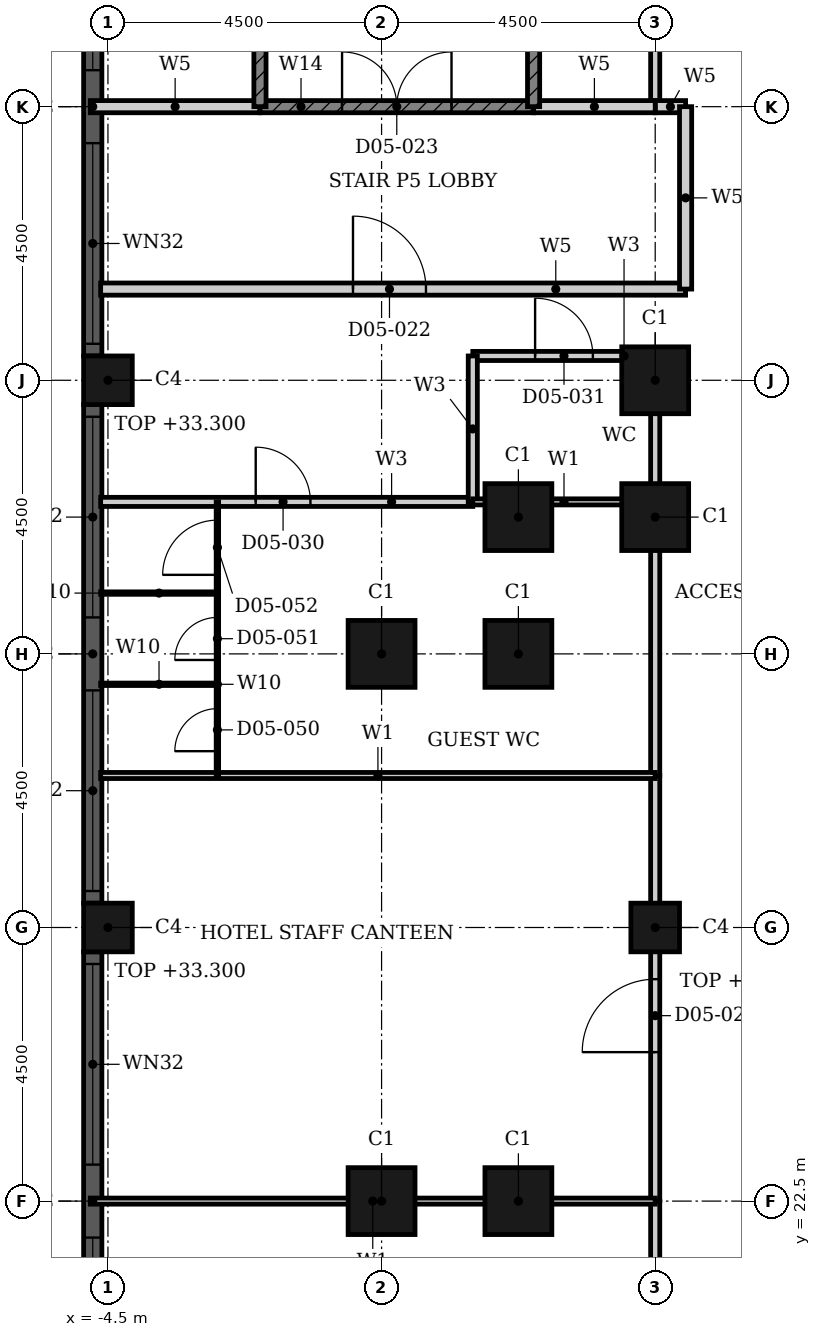
"""IFC4 building model, lengths in metres.
Left out: names, types, materials, properties, quantities, classifications, styles, units other than length and angle.
Written with IfcOpenShell. Run it as: python <this file> out.ifc"""

import sys

from ifc_helpers import new_model, si_unit, direction, frame, frame_2d, origin, origin_2d, place, context, subcontext, project, spatial, rectangle, hollow_rectangle, extrude, element, fill, save


model = new_model("IFC4")
c1 = context("Model", 3, precision=1e-05, world=origin(), true_north=direction((0.0, 1.0)))
c2 = subcontext(c1, "Body", "Model", "MODEL_VIEW")
j1 = project(units=[si_unit("LENGTHUNIT", "METRE"), si_unit("PLANEANGLEUNIT", "RADIAN")], contexts=[c1])
p1 = place(None, origin())
s1 = spatial("IfcSite", under=j1, at=p1, CompositionType="ELEMENT")
p2 = place(p1, origin())
s2 = spatial("IfcBuilding", under=s1, at=p2, CompositionType="ELEMENT")
p3 = place(p2, frame((0.0, 0.0, 28.8)))
s3 = spatial("IfcBuildingStorey", under=s2, at=p3, CompositionType="ELEMENT", Elevation=28.8)
for number, where, z_axis, x_axis in (
    (1, (4.5, 36.0, 0.0), (0.0, 0.0, 1.0), (1.0, 0.0, 0.0)),
    (2, (4.5, 33.75, 0.0), (0.0, 0.0, 1.0), (1.0, 0.0, 0.0)),
    (3, (2.25, 33.75, 0.0), (0.0, 0.0, 1.0), (1.0, 0.0, 0.0)),
    (4, (2.25, 31.5, 0.0), (0.0, 0.0, 1.0), (1.0, 0.0, 0.0)),
    (5, (0.0, 31.5, 0.0), (0.0, 0.0, 1.0), (1.0, 0.0, 0.0)),
    (6, (0.0, 22.5, 0.0), (0.0, 0.0, 1.0), (1.0, 0.0, 0.0)),
    (7, (2.25, 22.5, 0.0), (0.0, 0.0, 1.0), (1.0, 0.0, 0.0)),
):
    element("IfcColumn", number, at=place(p3, frame(where, z_axis=z_axis, x_axis=x_axis)), inside=s3, PredefinedType="COLUMN", context=c2, shape_type="SweptSolid", body=[
        extrude(hollow_rectangle(XDim=1.1, YDim=1.1, WallThickness=0.036, at=origin_2d()), origin(), (0.0, 0.0, 1.0), 4.8),
    ])
for number, where, z_axis, x_axis in (
    (8, (-4.5, 27.0, 0.0), (0.0, 0.0, 1.0), (1.0, 0.0, 0.0)),
    (9, (-4.5, 36.0, 0.0), (0.0, 0.0, 1.0), (1.0, 0.0, 0.0)),
    (10, (4.5, 27.0, 0.0), (0.0, 0.0, 1.0), (1.0, 0.0, 0.0)),
):
    element("IfcColumn", number, at=place(p3, frame(where, z_axis=z_axis, x_axis=x_axis)), inside=s3, PredefinedType="COLUMN", context=c2, shape_type="SweptSolid", body=[
        extrude(hollow_rectangle(XDim=0.8, YDim=0.8, WallThickness=0.025, at=origin_2d()), origin(), (0.0, 0.0, 1.0), 4.5),
    ])
p4 = place(p3, frame((-4.75, 44.6, 0.0), z_axis=(0.0, 0.0, 1.0), x_axis=(0.0, -1.0, 0.0)))
e11 = element("IfcWall", 11, at=p4, inside=s3, PredefinedType="SOLIDWALL", context=c2, shape_type="SweptSolid", body=[
    extrude(rectangle(XDim=8.2, YDim=0.3, at=frame_2d((4.1, 0.0))), origin(), (0.0, 0.0, 1.0), 4.8),
])
p5 = place(p4, frame((0.2, 0.0, 0.9)))
e12 = element("IfcOpeningElement", 12, at=p5, cuts=e11, PredefinedType="OPENING", context=c2, shape_type="SweptSolid", body=[
    extrude(rectangle(XDim=3.3, YDim=2.9, at=frame_2d((1.65, 1.45))), frame((0.0, 0.16, 0.0), z_axis=(0.0, -1.0, 0.0), x_axis=(1.0, 0.0, 0.0)), (0.0, 0.0, 1.0), 0.32),
])
p6 = place(p4, frame((4.7, 0.0, 0.9)))
e13 = element("IfcOpeningElement", 13, at=p6, cuts=e11, PredefinedType="OPENING", context=c2, shape_type="SweptSolid", body=[
    extrude(rectangle(XDim=3.3, YDim=2.9, at=frame_2d((1.65, 1.45))), frame((0.0, 0.16, 0.0), z_axis=(0.0, -1.0, 0.0), x_axis=(1.0, 0.0, 0.0)), (0.0, 0.0, 1.0), 0.32),
])
p7 = place(p3, frame((-4.75, 35.6, 0.0), z_axis=(0.0, 0.0, 1.0), x_axis=(0.0, -1.0, 0.0)))
e14 = element("IfcWall", 14, at=p7, inside=s3, PredefinedType="SOLIDWALL", context=c2, shape_type="SweptSolid", body=[
    extrude(rectangle(XDim=8.2, YDim=0.3, at=frame_2d((4.1, 0.0))), origin(), (0.0, 0.0, 1.0), 4.8),
])
p8 = place(p7, frame((0.2, 0.0, 0.9)))
e15 = element("IfcOpeningElement", 15, at=p8, cuts=e14, PredefinedType="OPENING", context=c2, shape_type="SweptSolid", body=[
    extrude(rectangle(XDim=3.3, YDim=2.9, at=frame_2d((1.65, 1.45))), frame((0.0, 0.16, 0.0), z_axis=(0.0, -1.0, 0.0), x_axis=(1.0, 0.0, 0.0)), (0.0, 0.0, 1.0), 0.32),
])
p9 = place(p7, frame((4.7, 0.0, 0.9)))
e16 = element("IfcOpeningElement", 16, at=p9, cuts=e14, PredefinedType="OPENING", context=c2, shape_type="SweptSolid", body=[
    extrude(rectangle(XDim=3.3, YDim=2.9, at=frame_2d((1.65, 1.45))), frame((0.0, 0.16, 0.0), z_axis=(0.0, -1.0, 0.0), x_axis=(1.0, 0.0, 0.0)), (0.0, 0.0, 1.0), 0.32),
])
p10 = place(p3, frame((-4.75, 26.6, 0.0), z_axis=(0.0, 0.0, 1.0), x_axis=(0.0, -1.0, 0.0)))
e17 = element("IfcWall", 17, at=p10, inside=s3, PredefinedType="SOLIDWALL", context=c2, shape_type="SweptSolid", body=[
    extrude(rectangle(XDim=8.2, YDim=0.3, at=frame_2d((4.1, 0.0))), origin(), (0.0, 0.0, 1.0), 4.8),
])
p11 = place(p10, frame((0.2, 0.0, 0.9)))
e18 = element("IfcOpeningElement", 18, at=p11, cuts=e17, PredefinedType="OPENING", context=c2, shape_type="SweptSolid", body=[
    extrude(rectangle(XDim=3.3, YDim=2.9, at=frame_2d((1.65, 1.45))), frame((0.0, 0.16, 0.0), z_axis=(0.0, -1.0, 0.0), x_axis=(1.0, 0.0, 0.0)), (0.0, 0.0, 1.0), 0.32),
])
p12 = place(p10, frame((4.7, 0.0, 0.9)))
e19 = element("IfcOpeningElement", 19, at=p12, cuts=e17, PredefinedType="OPENING", context=c2, shape_type="SweptSolid", body=[
    extrude(rectangle(XDim=3.3, YDim=2.9, at=frame_2d((1.65, 1.45))), frame((0.0, 0.16, 0.0), z_axis=(0.0, -1.0, 0.0), x_axis=(1.0, 0.0, 0.0)), (0.0, 0.0, 1.0), 0.32),
])
p13 = place(p3, frame((-4.62, 34.0, 0.0), z_axis=(0.0, 0.0, 1.0), x_axis=(1.0, 0.0, 0.0)))
e20 = element("IfcWall", 20, at=p13, inside=s3, PredefinedType="PARTITIONING", context=c2, shape_type="SweptSolid", body=[
    extrude(rectangle(XDim=6.12, YDim=0.15, at=frame_2d((3.06, 0.0))), origin(), (0.0, 0.0, 1.0), 4.5),
])
p14 = place(p13, frame((2.55, 0.0, 0.0)))
e21 = element("IfcOpeningElement", 21, at=p14, cuts=e20, PredefinedType="OPENING", context=c2, shape_type="SweptSolid", body=[
    extrude(rectangle(XDim=0.9, YDim=2.1, at=frame_2d((0.45, 1.05))), frame((0.0, 0.085, 0.0), z_axis=(0.0, -1.0, 0.0), x_axis=(1.0, 0.0, 0.0)), (0.0, 0.0, 1.0), 0.17),
])
p15 = place(p3, frame((1.5, 36.4, 0.0), z_axis=(0.0, 0.0, 1.0), x_axis=(1.0, 0.0, 0.0)))
e22 = element("IfcWall", 22, at=p15, inside=s3, PredefinedType="PARTITIONING", context=c2, shape_type="SweptSolid", body=[
    extrude(rectangle(XDim=3.0, YDim=0.15, at=frame_2d((1.5, 0.0))), origin(), (0.0, 0.0, 1.0), 4.5),
])
p16 = place(p15, frame((1.025, 0.0, 0.0)))
e23 = element("IfcOpeningElement", 23, at=p16, cuts=e22, PredefinedType="OPENING", context=c2, shape_type="SweptSolid", body=[
    extrude(rectangle(XDim=0.95, YDim=2.1, at=frame_2d((0.475, 1.05))), frame((0.0, 0.085, 0.0), z_axis=(0.0, -1.0, 0.0), x_axis=(1.0, 0.0, 0.0)), (0.0, 0.0, 1.0), 0.17),
])
p17 = place(p3, frame((1.5, 34.0, 0.0), z_axis=(0.0, 0.0, 1.0), x_axis=(0.0, 1.0, 0.0)))
e24 = element("IfcWall", 24, at=p17, inside=s3, PredefinedType="PARTITIONING", context=c2, shape_type="SweptSolid", body=[
    extrude(rectangle(XDim=2.4, YDim=0.15, at=frame_2d((1.2, 0.0))), origin(), (0.0, 0.0, 1.0), 4.5),
])
p18 = place(p3, frame((4.5, 9.0, 0.0), z_axis=(0.0, 0.0, 1.0), x_axis=(0.0, 1.0, 0.0)))
e25 = element("IfcWall", 25, at=p18, inside=s3, PredefinedType="PARTITIONING", context=c2, shape_type="SweptSolid", body=[
    extrude(rectangle(XDim=13.5, YDim=0.15, at=frame_2d((6.75, 0.0))), origin(), (0.0, 0.0, 1.0), 3.88),
])
p19 = place(p18, frame((6.3, 0.0, 0.0)))
e26 = element("IfcOpeningElement", 26, at=p19, cuts=e25, PredefinedType="OPENING", context=c2, shape_type="SweptSolid", body=[
    extrude(rectangle(XDim=0.9, YDim=2.1, at=frame_2d((0.45, 1.05))), frame((0.0, 0.085, 0.0), z_axis=(0.0, -1.0, 0.0), x_axis=(1.0, 0.0, 0.0)), (0.0, 0.0, 1.0), 0.17),
])
p20 = place(p3, frame((4.5, 22.5, 0.0), z_axis=(0.0, 0.0, 1.0), x_axis=(0.0, 1.0, 0.0)))
e27 = element("IfcWall", 27, at=p20, inside=s3, PredefinedType="PARTITIONING", context=c2, shape_type="SweptSolid", body=[
    extrude(rectangle(XDim=7.0, YDim=0.15, at=frame_2d((3.5, 0.0))), origin(), (0.0, 0.0, 1.0), 4.5),
])
p21 = place(p20, frame((2.45, 0.0, 0.0)))
e28 = element("IfcOpeningElement", 28, at=p21, cuts=e27, PredefinedType="OPENING", context=c2, shape_type="SweptSolid", body=[
    extrude(rectangle(XDim=1.2, YDim=2.4, at=frame_2d((0.6, 1.2))), frame((0.0, 0.085, 0.0), z_axis=(0.0, -1.0, 0.0), x_axis=(1.0, 0.0, 0.0)), (0.0, 0.0, 1.0), 0.17),
])
p22 = place(p3, frame((4.5, 29.5, 0.0), z_axis=(0.0, 0.0, 1.0), x_axis=(0.0, 1.0, 0.0)))
e29 = element("IfcWall", 29, at=p22, inside=s3, PredefinedType="PARTITIONING", context=c2, shape_type="SweptSolid", body=[
    extrude(rectangle(XDim=4.5, YDim=0.15, at=frame_2d((2.25, 0.0))), origin(), (0.0, 0.0, 1.0), 4.5),
])
p23 = place(p3, frame((4.5, 34.0, 0.0), z_axis=(0.0, 0.0, 1.0), x_axis=(0.0, 1.0, 0.0)))
e30 = element("IfcWall", 30, at=p23, inside=s3, PredefinedType="PARTITIONING", context=c2, shape_type="SweptSolid", body=[
    extrude(rectangle(XDim=2.4, YDim=0.15, at=frame_2d((1.2, 0.0))), origin(), (0.0, 0.0, 1.0), 3.88),
])
p24 = place(p3, frame((4.5, 40.5, 0.0), z_axis=(0.0, 0.0, 1.0), x_axis=(0.0, 1.0, 0.0)))
e31 = element("IfcWall", 31, at=p24, inside=s3, PredefinedType="PARTITIONING", context=c2, shape_type="SweptSolid", body=[
    extrude(rectangle(XDim=13.69, YDim=0.15, at=frame_2d((6.845, 0.0))), origin(), (0.0, 0.0, 1.0), 4.5),
])
p25 = place(p24, frame((6.15, 0.0, 0.0)))
e32 = element("IfcOpeningElement", 32, at=p25, cuts=e31, PredefinedType="OPENING", context=c2, shape_type="SweptSolid", body=[
    extrude(rectangle(XDim=1.2, YDim=2.4, at=frame_2d((0.6, 1.2))), frame((0.0, 0.085, 0.0), z_axis=(0.0, -1.0, 0.0), x_axis=(1.0, 0.0, 0.0)), (0.0, 0.0, 1.0), 0.17),
])
p26 = place(p3, frame((-4.79, 22.5, 0.0), z_axis=(0.0, 0.0, 1.0), x_axis=(1.0, 0.0, 0.0)))
e33 = element("IfcWall", 33, at=p26, inside=s3, PredefinedType="PARTITIONING", context=c2, shape_type="SweptSolid", body=[
    extrude(rectangle(XDim=9.29, YDim=0.1, at=frame_2d((4.645, 0.0))), origin(), (0.0, 0.0, 1.0), 3.78),
])
p27 = place(p3, frame((-4.62, 29.5, 0.0), z_axis=(0.0, 0.0, 1.0), x_axis=(1.0, 0.0, 0.0)))
e34 = element("IfcWall", 34, at=p27, inside=s3, PredefinedType="PARTITIONING", context=c2, shape_type="SweptSolid", body=[
    extrude(rectangle(XDim=9.12, YDim=0.1, at=frame_2d((4.56, 0.0))), origin(), (0.0, 0.0, 1.0), 4.5),
])
p28 = place(p3, frame((1.5, 34.0, 0.0), z_axis=(0.0, 0.0, 1.0), x_axis=(1.0, 0.0, 0.0)))
e35 = element("IfcWall", 35, at=p28, inside=s3, PredefinedType="PARTITIONING", context=c2, shape_type="SweptSolid", body=[
    extrude(rectangle(XDim=3.0, YDim=0.1, at=frame_2d((1.5, 0.0))), origin(), (0.0, 0.0, 1.0), 4.5),
])
p29 = place(p3, frame((-4.62, 37.5, 0.0), z_axis=(0.0, 0.0, 1.0), x_axis=(1.0, 0.0, 0.0)))
e36 = element("IfcWall", 36, at=p29, inside=s3, PredefinedType="PARTITIONING", context=c2, shape_type="SweptSolid", body=[
    extrude(rectangle(XDim=9.62, YDim=0.2, at=frame_2d((4.81, 0.0))), origin(), (0.0, 0.0, 1.0), 4.5),
])
p30 = place(p29, frame((4.15, 0.0, 0.0)))
e37 = element("IfcOpeningElement", 37, at=p30, cuts=e36, PredefinedType="OPENING", context=c2, shape_type="SweptSolid", body=[
    extrude(rectangle(XDim=1.2, YDim=2.1, at=frame_2d((0.6, 1.05))), frame((0.0, 0.11, 0.0), z_axis=(0.0, -1.0, 0.0), x_axis=(1.0, 0.0, 0.0)), (0.0, 0.0, 1.0), 0.22),
])
p31 = place(p3, frame((4.5, 40.5, 0.0), z_axis=(0.0, 0.0, 1.0), x_axis=(1.0, 0.0, 0.0)))
e38 = element("IfcWall", 38, at=p31, inside=s3, PredefinedType="PARTITIONING", context=c2, shape_type="SweptSolid", body=[
    extrude(rectangle(XDim=0.5, YDim=0.2, at=frame_2d((0.25, 0.0))), origin(), (0.0, 0.0, 1.0), 4.5),
])
p32 = place(p3, frame((-4.79, 40.5, 0.0), z_axis=(0.0, 0.0, 1.0), x_axis=(1.0, 0.0, 0.0)))
e39 = element("IfcWall", 39, at=p32, inside=s3, PredefinedType="PARTITIONING", context=c2, shape_type="SweptSolid", body=[
    extrude(rectangle(XDim=2.79, YDim=0.2, at=frame_2d((1.395, 0.0))), origin(), (0.0, 0.0, 1.0), 4.5),
])
p33 = place(p3, frame((2.5, 40.5, 0.0), z_axis=(0.0, 0.0, 1.0), x_axis=(1.0, 0.0, 0.0)))
e40 = element("IfcWall", 40, at=p33, inside=s3, PredefinedType="PARTITIONING", context=c2, shape_type="SweptSolid", body=[
    extrude(rectangle(XDim=2.0, YDim=0.2, at=frame_2d((1.0, 0.0))), origin(), (0.0, 0.0, 1.0), 4.5),
])
p34 = place(p3, frame((5.0, 37.5, 0.0), z_axis=(0.0, 0.0, 1.0), x_axis=(0.0, 1.0, 0.0)))
e41 = element("IfcWall", 41, at=p34, inside=s3, PredefinedType="PARTITIONING", context=c2, shape_type="SweptSolid", body=[
    extrude(rectangle(XDim=3.0, YDim=0.2, at=frame_2d((1.5, 0.0))), origin(), (0.0, 0.0, 1.0), 4.5),
])
p35 = place(p3, frame((-2.0, 40.5, 0.0), z_axis=(0.0, 0.0, 1.0), x_axis=(1.0, 0.0, 0.0)))
e42 = element("IfcWall", 42, at=p35, inside=s3, PredefinedType="SHEAR", context=c2, shape_type="SweptSolid", body=[
    extrude(rectangle(XDim=4.5, YDim=0.2, at=frame_2d((2.25, 0.0))), origin(), (0.0, 0.0, 1.0), 4.5),
])
p36 = place(p35, frame((1.35, 0.0, 0.0)))
e43 = element("IfcOpeningElement", 43, at=p36, cuts=e42, PredefinedType="OPENING", context=c2, shape_type="SweptSolid", body=[
    extrude(rectangle(XDim=1.8, YDim=2.1, at=frame_2d((0.9, 1.05))), frame((0.0, 0.11, 0.0), z_axis=(0.0, -1.0, 0.0), x_axis=(1.0, 0.0, 0.0)), (0.0, 0.0, 1.0), 0.22),
])
for number, where, z_axis, x_axis in (
    (44, (-2.0, 40.5, 0.0), (0.0, 0.0, 1.0), (0.0, 1.0, 0.0)),
    (45, (2.5, 40.5, 0.0), (0.0, 0.0, 1.0), (0.0, 1.0, 0.0)),
):
    element("IfcWall", number, at=place(p3, frame(where, z_axis=z_axis, x_axis=x_axis)), inside=s3, PredefinedType="SHEAR", context=c2, shape_type="SweptSolid", body=[
        extrude(rectangle(XDim=8.45, YDim=0.2, at=frame_2d((4.225, 0.0))), origin(), (0.0, 0.0, 1.0), 4.5),
    ])
for number, where, z_axis, x_axis in (
    (46, (-4.62, 31.0, 0.0), (0.0, 0.0, 1.0), (1.0, 0.0, 0.0)),
    (47, (-4.62, 32.5, 0.0), (0.0, 0.0, 1.0), (1.0, 0.0, 0.0)),
):
    element("IfcWall", number, at=place(p3, frame(where, z_axis=z_axis, x_axis=x_axis)), inside=s3, PredefinedType="PARTITIONING", context=c2, shape_type="SweptSolid", body=[
        extrude(rectangle(XDim=1.92, YDim=0.04, at=frame_2d((0.96, 0.0))), origin(), (0.0, 0.0, 1.0), 4.5),
    ])
p37 = place(p3, frame((-2.7, 29.5, 0.0), z_axis=(0.0, 0.0, 1.0), x_axis=(0.0, 1.0, 0.0)))
e48 = element("IfcWall", 48, at=p37, inside=s3, PredefinedType="PARTITIONING", context=c2, shape_type="SweptSolid", body=[
    extrude(rectangle(XDim=4.5, YDim=0.04, at=frame_2d((2.25, 0.0))), origin(), (0.0, 0.0, 1.0), 4.5),
])
p38 = place(p37, frame((0.4, 0.0, 0.0)))
e49 = element("IfcOpeningElement", 49, at=p38, cuts=e48, PredefinedType="OPENING", context=c2, shape_type="SweptSolid", body=[
    extrude(rectangle(XDim=0.7, YDim=2.0, at=frame_2d((0.35, 1.0))), frame((0.0, 0.03, 0.0), z_axis=(0.0, -1.0, 0.0), x_axis=(1.0, 0.0, 0.0)), (0.0, 0.0, 1.0), 0.06),
])
p39 = place(p37, frame((1.9, 0.0, 0.0)))
e50 = element("IfcOpeningElement", 50, at=p39, cuts=e48, PredefinedType="OPENING", context=c2, shape_type="SweptSolid", body=[
    extrude(rectangle(XDim=0.7, YDim=2.0, at=frame_2d((0.35, 1.0))), frame((0.0, 0.03, 0.0), z_axis=(0.0, -1.0, 0.0), x_axis=(1.0, 0.0, 0.0)), (0.0, 0.0, 1.0), 0.06),
])
p40 = place(p37, frame((3.3, 0.0, 0.0)))
e51 = element("IfcOpeningElement", 51, at=p40, cuts=e48, PredefinedType="OPENING", context=c2, shape_type="SweptSolid", body=[
    extrude(rectangle(XDim=0.9, YDim=2.0, at=frame_2d((0.45, 1.0))), frame((0.0, 0.03, 0.0), z_axis=(0.0, -1.0, 0.0), x_axis=(1.0, 0.0, 0.0)), (0.0, 0.0, 1.0), 0.06),
])
p41 = place(p5, origin())
e52 = element("IfcWindow", 52, at=p41, inside=s3, PartitioningType="SINGLE_PANEL", PredefinedType="WINDOW", context=c2, shape_type="SweptSolid", body=[
    extrude(rectangle(XDim=3.3, YDim=2.9, at=frame_2d((1.65, 1.45))), frame((0.0, 0.03, 0.0), z_axis=(0.0, -1.0, 0.0), x_axis=(1.0, 0.0, 0.0)), (0.0, 0.0, 1.0), 0.06),
])
fill(e12, e52)
p42 = place(p6, origin())
e53 = element("IfcWindow", 53, at=p42, inside=s3, PartitioningType="SINGLE_PANEL", PredefinedType="WINDOW", context=c2, shape_type="SweptSolid", body=[
    extrude(rectangle(XDim=3.3, YDim=2.9, at=frame_2d((1.65, 1.45))), frame((0.0, 0.03, 0.0), z_axis=(0.0, -1.0, 0.0), x_axis=(1.0, 0.0, 0.0)), (0.0, 0.0, 1.0), 0.06),
])
fill(e13, e53)
p43 = place(p8, origin())
e54 = element("IfcWindow", 54, at=p43, inside=s3, PartitioningType="SINGLE_PANEL", PredefinedType="WINDOW", context=c2, shape_type="SweptSolid", body=[
    extrude(rectangle(XDim=3.3, YDim=2.9, at=frame_2d((1.65, 1.45))), frame((0.0, 0.03, 0.0), z_axis=(0.0, -1.0, 0.0), x_axis=(1.0, 0.0, 0.0)), (0.0, 0.0, 1.0), 0.06),
])
fill(e15, e54)
p44 = place(p9, origin())
e55 = element("IfcWindow", 55, at=p44, inside=s3, PartitioningType="SINGLE_PANEL", PredefinedType="WINDOW", context=c2, shape_type="SweptSolid", body=[
    extrude(rectangle(XDim=3.3, YDim=2.9, at=frame_2d((1.65, 1.45))), frame((0.0, 0.03, 0.0), z_axis=(0.0, -1.0, 0.0), x_axis=(1.0, 0.0, 0.0)), (0.0, 0.0, 1.0), 0.06),
])
fill(e16, e55)
p45 = place(p11, origin())
e56 = element("IfcWindow", 56, at=p45, inside=s3, PartitioningType="SINGLE_PANEL", PredefinedType="WINDOW", context=c2, shape_type="SweptSolid", body=[
    extrude(rectangle(XDim=3.3, YDim=2.9, at=frame_2d((1.65, 1.45))), frame((0.0, 0.03, 0.0), z_axis=(0.0, -1.0, 0.0), x_axis=(1.0, 0.0, 0.0)), (0.0, 0.0, 1.0), 0.06),
])
fill(e18, e56)
p46 = place(p12, origin())
e57 = element("IfcWindow", 57, at=p46, inside=s3, PartitioningType="SINGLE_PANEL", PredefinedType="WINDOW", context=c2, shape_type="SweptSolid", body=[
    extrude(rectangle(XDim=3.3, YDim=2.9, at=frame_2d((1.65, 1.45))), frame((0.0, 0.03, 0.0), z_axis=(0.0, -1.0, 0.0), x_axis=(1.0, 0.0, 0.0)), (0.0, 0.0, 1.0), 0.06),
])
fill(e19, e57)
p47 = place(p30, origin())
e58 = element("IfcDoor", 58, at=p47, inside=s3, OperationType="SINGLE_SWING_LEFT", PredefinedType="DOOR", context=c2, shape_type="SweptSolid", body=[
    extrude(rectangle(XDim=1.2, YDim=2.1, at=frame_2d((0.6, 1.05))), frame((0.0, 0.025, 0.0), z_axis=(0.0, -1.0, 0.0), x_axis=(1.0, 0.0, 0.0)), (0.0, 0.0, 1.0), 0.05),
])
fill(e37, e58)
p48 = place(p36, origin())
e59 = element("IfcDoor", 59, at=p48, inside=s3, OperationType="DOUBLE_DOOR_SINGLE_SWING", PredefinedType="DOOR", context=c2, shape_type="SweptSolid", body=[
    extrude(rectangle(XDim=1.8, YDim=2.1, at=frame_2d((0.9, 1.05))), frame((0.0, 0.025, 0.0), z_axis=(0.0, -1.0, 0.0), x_axis=(1.0, 0.0, 0.0)), (0.0, 0.0, 1.0), 0.05),
])
fill(e43, e59)
p49 = place(p21, origin())
e60 = element("IfcDoor", 60, at=p49, inside=s3, OperationType="SINGLE_SWING_LEFT", PredefinedType="DOOR", context=c2, shape_type="SweptSolid", body=[
    extrude(rectangle(XDim=1.2, YDim=2.4, at=frame_2d((0.6, 1.2))), frame((0.0, 0.025, 0.0), z_axis=(0.0, -1.0, 0.0), x_axis=(1.0, 0.0, 0.0)), (0.0, 0.0, 1.0), 0.05),
])
fill(e28, e60)
p50 = place(p14, origin())
e61 = element("IfcDoor", 61, at=p50, inside=s3, OperationType="SINGLE_SWING_RIGHT", PredefinedType="DOOR", context=c2, shape_type="SweptSolid", body=[
    extrude(rectangle(XDim=0.9, YDim=2.1, at=frame_2d((0.45, 1.05))), frame((0.0, 0.025, 0.0), z_axis=(0.0, -1.0, 0.0), x_axis=(1.0, 0.0, 0.0)), (0.0, 0.0, 1.0), 0.05),
])
fill(e21, e61)
p51 = place(p16, origin())
e62 = element("IfcDoor", 62, at=p51, inside=s3, OperationType="SINGLE_SWING_RIGHT", PredefinedType="DOOR", context=c2, shape_type="SweptSolid", body=[
    extrude(rectangle(XDim=0.95, YDim=2.1, at=frame_2d((0.475, 1.05))), frame((0.0, 0.025, 0.0), z_axis=(0.0, -1.0, 0.0), x_axis=(1.0, 0.0, 0.0)), (0.0, 0.0, 1.0), 0.05),
])
fill(e23, e62)
p52 = place(p38, origin())
e63 = element("IfcDoor", 63, at=p52, inside=s3, OperationType="SINGLE_SWING_LEFT", PredefinedType="DOOR", context=c2, shape_type="SweptSolid", body=[
    extrude(rectangle(XDim=0.7, YDim=2.0, at=frame_2d((0.35, 1.0))), frame((0.0, 0.02, 0.0), z_axis=(0.0, -1.0, 0.0), x_axis=(1.0, 0.0, 0.0)), (0.0, 0.0, 1.0), 0.04),
])
fill(e49, e63)
p53 = place(p39, origin())
e64 = element("IfcDoor", 64, at=p53, inside=s3, OperationType="SINGLE_SWING_RIGHT", PredefinedType="DOOR", context=c2, shape_type="SweptSolid", body=[
    extrude(rectangle(XDim=0.7, YDim=2.0, at=frame_2d((0.35, 1.0))), frame((0.0, 0.02, 0.0), z_axis=(0.0, -1.0, 0.0), x_axis=(1.0, 0.0, 0.0)), (0.0, 0.0, 1.0), 0.04),
])
fill(e50, e64)
p54 = place(p40, origin())
e65 = element("IfcDoor", 65, at=p54, inside=s3, OperationType="SINGLE_SWING_RIGHT", PredefinedType="DOOR", context=c2, shape_type="SweptSolid", body=[
    extrude(rectangle(XDim=0.9, YDim=2.0, at=frame_2d((0.45, 1.0))), frame((0.0, 0.02, 0.0), z_axis=(0.0, -1.0, 0.0), x_axis=(1.0, 0.0, 0.0)), (0.0, 0.0, 1.0), 0.04),
])
fill(e51, e65)
save(model, sys.argv[1])
